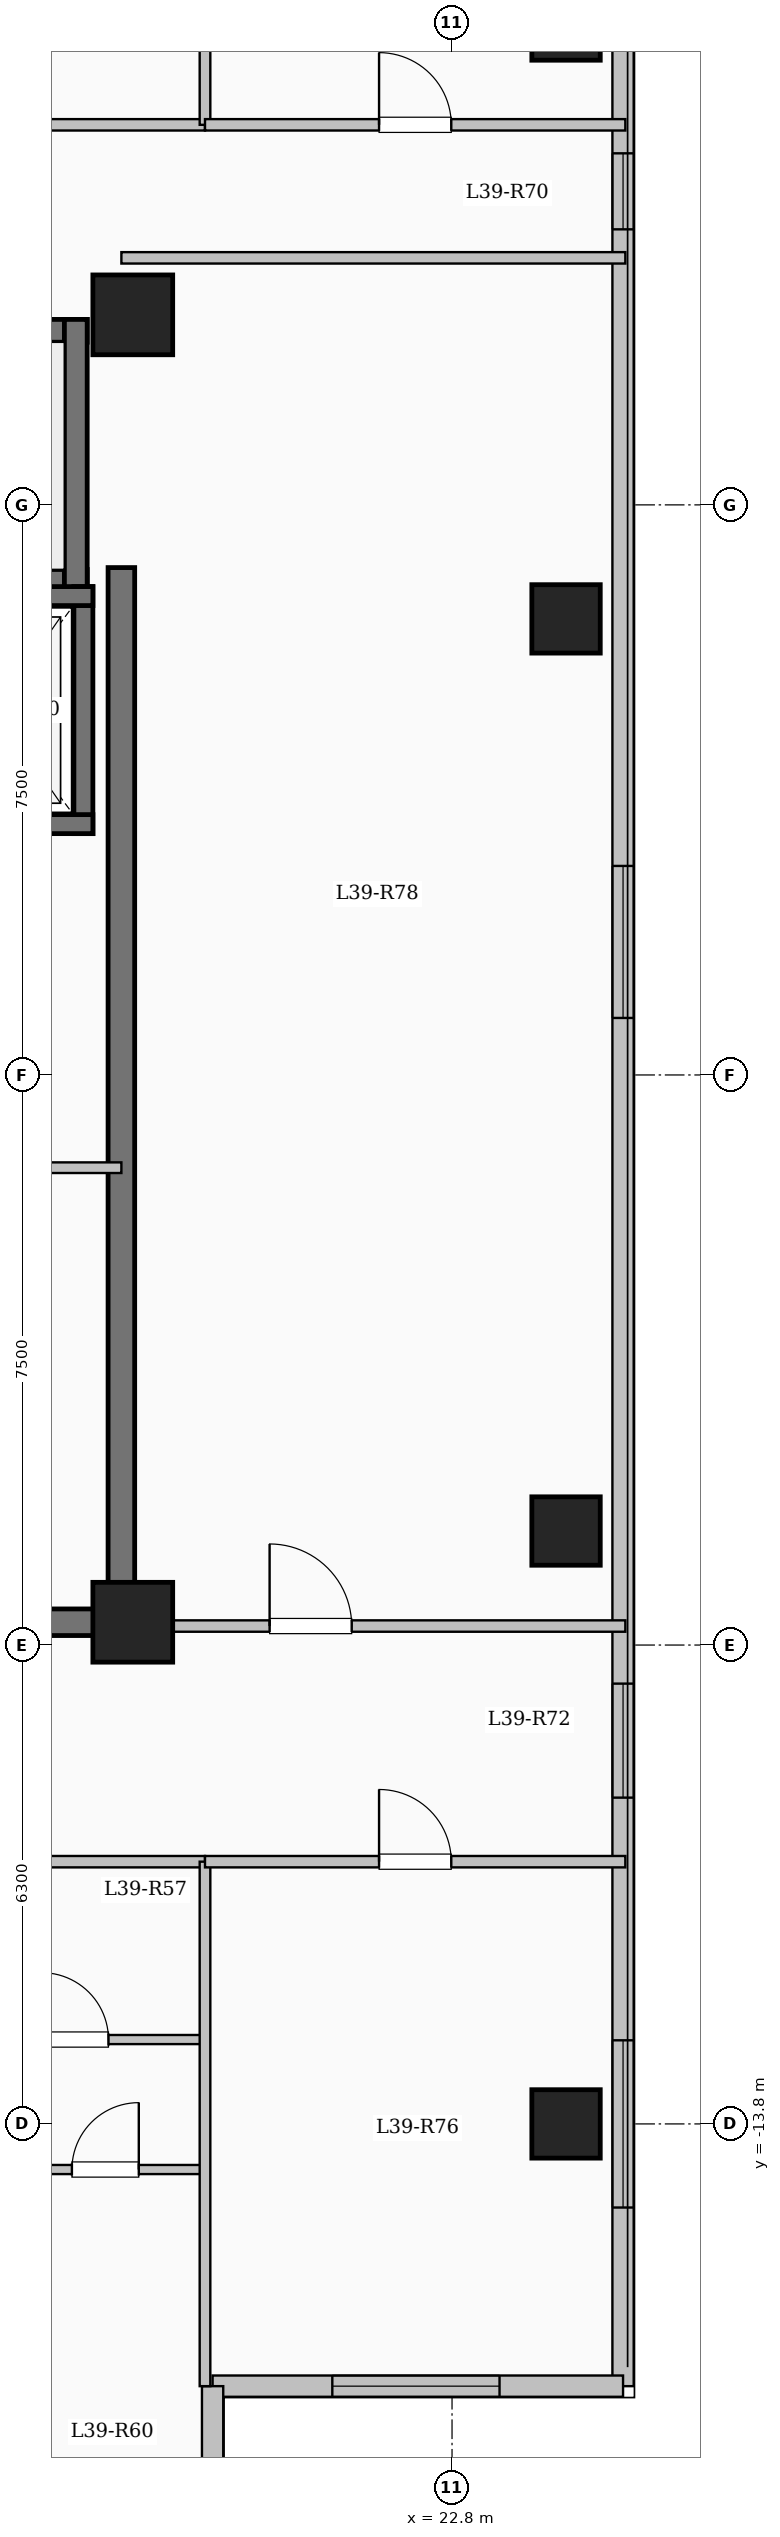
"""IFC4 building model, lengths in metres.
Left out: names, types, materials, properties, quantities, classifications, styles, units other than length and angle.
Written with IfcOpenShell. Run it as: python <this file> out.ifc"""

import sys

from ifc_helpers import new_model, si_unit, direction, frame, frame_2d, origin, origin_2d, place, context, subcontext, project, spatial, rectangle, extrude, element, fill, save


model = new_model("IFC4")
c1 = context("Model", 3, precision=1e-05, world=origin(), true_north=direction((0.0, 1.0)))
c2 = subcontext(c1, "Body", "Model", "MODEL_VIEW")
j1 = project(units=[si_unit("LENGTHUNIT", "METRE"), si_unit("PLANEANGLEUNIT", "RADIAN")], contexts=[c1])
p1 = place(None, origin())
s1 = spatial("IfcSite", under=j1, at=p1, CompositionType="ELEMENT")
p2 = place(p1, origin())
s2 = spatial("IfcBuilding", under=s1, at=p2, CompositionType="ELEMENT")
p3 = place(p2, frame((0.0, 0.0, 146.0)))
s3 = spatial("IfcBuildingStorey", under=s2, at=p3, CompositionType="ELEMENT", Elevation=146.0)
for number, where, z_axis, x_axis in (
    (1, (18.6, -7.2, 0.0), (0.0, 0.0, 1.0), (1.0, 0.0, 0.0)),
    (2, (18.6, 10.0, 0.0), (0.0, 0.0, 1.0), (1.0, 0.0, 0.0)),
):
    element("IfcColumn", number, at=place(p3, frame(where, z_axis=z_axis, x_axis=x_axis)), inside=s3, PredefinedType="COLUMN", context=c2, shape_type="SweptSolid", body=[
        extrude(rectangle(XDim=1.05, YDim=1.05, at=origin_2d()), origin(), (0.0, 0.0, 1.0), 3.35),
    ])
for number, where, z_axis, x_axis in (
    (3, (24.3, -13.8, 0.0), (0.0, 0.0, 1.0), (1.0, 0.0, 0.0)),
    (4, (24.3, -6.0, 0.0), (0.0, 0.0, 1.0), (1.0, 0.0, 0.0)),
    (5, (24.3, 6.0, 0.0), (0.0, 0.0, 1.0), (1.0, 0.0, 0.0)),
    (6, (24.3, 13.8, 0.0), (0.0, 0.0, 1.0), (1.0, 0.0, 0.0)),
):
    element("IfcColumn", number, at=place(p3, frame(where, z_axis=z_axis, x_axis=x_axis)), inside=s3, PredefinedType="COLUMN", context=c2, shape_type="SweptSolid", body=[
        extrude(rectangle(XDim=0.9, YDim=0.9, at=origin_2d()), origin(), (0.0, 0.0, 1.0), 3.35),
    ])
p4 = place(p3, frame((25.05, 17.25, 0.0), z_axis=(0.0, 0.0, 1.0), x_axis=(0.0, -1.0, 0.0)))
e7 = element("IfcWall", 7, at=p4, inside=s3, PredefinedType="SOLIDWALL", context=c2, shape_type="SweptSolid", body=[
    extrude(rectangle(XDim=34.5, YDim=0.28, at=frame_2d((17.25, 0.0))), origin(), (0.0, 0.0, 1.0), 3.1),
])
p5 = place(p4, frame((1.375, 0.0, 0.9)))
e8 = element("IfcOpeningElement", 8, at=p5, cuts=e7, PredefinedType="OPENING", context=c2, shape_type="SweptSolid", body=[
    extrude(rectangle(XDim=2.0, YDim=1.7, at=frame_2d((1.0, 0.85))), frame((0.0, 0.15, 0.0), z_axis=(0.0, -1.0, 0.0), x_axis=(1.0, 0.0, 0.0)), (0.0, 0.0, 1.0), 0.3),
])
p6 = place(p4, frame((5.125, 0.0, 0.95)))
e9 = element("IfcOpeningElement", 9, at=p6, cuts=e7, PredefinedType="OPENING", context=c2, shape_type="SweptSolid", body=[
    extrude(rectangle(XDim=1.0, YDim=1.5, at=frame_2d((0.5, 0.75))), frame((0.0, 0.15, 0.0), z_axis=(0.0, -1.0, 0.0), x_axis=(1.0, 0.0, 0.0)), (0.0, 0.0, 1.0), 0.3),
])
p7 = place(p4, frame((14.5, 0.0, 0.9)))
e10 = element("IfcOpeningElement", 10, at=p7, cuts=e7, PredefinedType="OPENING", context=c2, shape_type="SweptSolid", body=[
    extrude(rectangle(XDim=2.0, YDim=1.7, at=frame_2d((1.0, 0.85))), frame((0.0, 0.15, 0.0), z_axis=(0.0, -1.0, 0.0), x_axis=(1.0, 0.0, 0.0)), (0.0, 0.0, 1.0), 0.3),
])
p8 = place(p4, frame((25.258, 0.0, 0.9)))
e11 = element("IfcOpeningElement", 11, at=p8, cuts=e7, PredefinedType="OPENING", context=c2, shape_type="SweptSolid", body=[
    extrude(rectangle(XDim=1.5, YDim=1.65, at=frame_2d((0.75, 0.825))), frame((0.0, 0.15, 0.0), z_axis=(0.0, -1.0, 0.0), x_axis=(1.0, 0.0, 0.0)), (0.0, 0.0, 1.0), 0.3),
])
p9 = place(p4, frame((29.95, 0.0, 0.9)))
e12 = element("IfcOpeningElement", 12, at=p9, cuts=e7, PredefinedType="OPENING", context=c2, shape_type="SweptSolid", body=[
    extrude(rectangle(XDim=2.2, YDim=1.75, at=frame_2d((1.1, 0.875))), frame((0.0, 0.15, 0.0), z_axis=(0.0, -1.0, 0.0), x_axis=(1.0, 0.0, 0.0)), (0.0, 0.0, 1.0), 0.3),
])
p10 = place(p3, frame((25.05, -17.25, 0.0), z_axis=(0.0, 0.0, 1.0), x_axis=(-1.0, 0.0, 0.0)))
e13 = element("IfcWall", 13, at=p10, inside=s3, PredefinedType="SOLIDWALL", context=c2, shape_type="SweptSolid", body=[
    extrude(rectangle(XDim=5.4, YDim=0.28, at=frame_2d((2.7, 0.0))), origin(), (0.0, 0.0, 1.0), 3.1),
])
p11 = place(p10, frame((1.625, 0.0, 0.9)))
e14 = element("IfcOpeningElement", 14, at=p11, cuts=e13, PredefinedType="OPENING", context=c2, shape_type="SweptSolid", body=[
    extrude(rectangle(XDim=2.2, YDim=1.75, at=frame_2d((1.1, 0.875))), frame((0.0, 0.15, 0.0), z_axis=(0.0, -1.0, 0.0), x_axis=(1.0, 0.0, 0.0)), (0.0, 0.0, 1.0), 0.3),
])
p12 = place(p3, frame((19.65, -17.25, 0.0), z_axis=(0.0, 0.0, 1.0), x_axis=(0.0, -1.0, 0.0)))
e15 = element("IfcWall", 15, at=p12, inside=s3, PredefinedType="SOLIDWALL", context=c2, shape_type="SweptSolid", body=[
    extrude(rectangle(XDim=3.9, YDim=0.28, at=frame_2d((1.95, 0.0))), origin(), (0.0, 0.0, 1.0), 3.1),
])
p13 = place(p12, frame((1.107, 0.0, 0.9)))
e16 = element("IfcOpeningElement", 16, at=p13, cuts=e15, PredefinedType="OPENING", context=c2, shape_type="SweptSolid", body=[
    extrude(rectangle(XDim=1.65, YDim=1.6, at=frame_2d((0.825, 0.8))), frame((0.0, 0.15, 0.0), z_axis=(0.0, -1.0, 0.0), x_axis=(1.0, 0.0, 0.0)), (0.0, 0.0, 1.0), 0.3),
])
p14 = place(p3, frame((10.0, 9.79, 0.0), z_axis=(0.0, 0.0, 1.0), x_axis=(1.0, 0.0, 0.0)))
e17 = element("IfcWall", 17, at=p14, inside=s3, PredefinedType="SHEAR", context=c2, shape_type="SweptSolid", body=[
    extrude(rectangle(XDim=8.0, YDim=0.3, at=frame_2d((4.0, 0.0))), origin(), (0.0, 0.0, 1.0), 3.35),
])
p15 = place(p3, frame((10.0, 6.5, 0.0), z_axis=(0.0, 0.0, 1.0), x_axis=(1.0, 0.0, 0.0)))
e18 = element("IfcWall", 18, at=p15, inside=s3, PredefinedType="SHEAR", context=c2, shape_type="SweptSolid", body=[
    extrude(rectangle(XDim=8.0, YDim=0.3, at=frame_2d((4.0, 0.0))), origin(), (0.0, 0.0, 1.0), 3.35),
])
p16 = place(p15, frame((0.55, 0.0, 0.0)))
e19 = element("IfcOpeningElement", 19, at=p16, cuts=e18, PredefinedType="OPENING", context=c2, shape_type="SweptSolid", body=[
    extrude(rectangle(XDim=1.0, YDim=2.15, at=frame_2d((0.5, 1.075))), frame((0.0, 0.16, 0.0), z_axis=(0.0, -1.0, 0.0), x_axis=(1.0, 0.0, 0.0)), (0.0, 0.0, 1.0), 0.32),
])
p17 = place(p3, frame((17.85, 6.35, 0.0), z_axis=(0.0, 0.0, 1.0), x_axis=(0.0, 1.0, 0.0)))
e20 = element("IfcWall", 20, at=p17, inside=s3, PredefinedType="SHEAR", context=c2, shape_type="SweptSolid", body=[
    extrude(rectangle(XDim=3.59, YDim=0.3, at=frame_2d((1.795, 0.0))), origin(), (0.0, 0.0, 1.0), 3.35),
])
p18 = place(p3, frame((17.95, 3.175, 0.0), z_axis=(0.0, 0.0, 1.0), x_axis=(0.0, 1.0, 0.0)))
e21 = element("IfcWall", 21, at=p18, inside=s3, PredefinedType="SHEAR", context=c2, shape_type="SweptSolid", body=[
    extrude(rectangle(XDim=3.25, YDim=0.25, at=frame_2d((1.625, 0.0))), origin(), (0.0, 0.0, 1.0), 3.35),
])
for number, where, z_axis, x_axis in (
    (22, (15.525, 3.3, 0.0), (0.0, 0.0, 1.0), (1.0, 0.0, 0.0)),
    (23, (15.525, 6.3, 0.0), (0.0, 0.0, 1.0), (1.0, 0.0, 0.0)),
):
    element("IfcWall", number, at=place(p3, frame(where, z_axis=z_axis, x_axis=x_axis)), inside=s3, PredefinedType="SHEAR", context=c2, shape_type="SweptSolid", body=[
        extrude(rectangle(XDim=2.55, YDim=0.25, at=frame_2d((1.275, 0.0))), origin(), (0.0, 0.0, 1.0), 3.35),
    ])
p19 = place(p3, frame((18.45, -7.375, 0.0), z_axis=(0.0, 0.0, 1.0), x_axis=(0.0, 1.0, 0.0)))
e24 = element("IfcWall", 24, at=p19, inside=s3, PredefinedType="SHEAR", context=c2, shape_type="SweptSolid", body=[
    extrude(rectangle(XDim=14.05, YDim=0.35, at=frame_2d((7.025, 0.0))), origin(), (0.0, 0.0, 1.0), 3.35),
])
p20 = place(p3, frame((10.075, -7.2, 0.0), z_axis=(0.0, 0.0, 1.0), x_axis=(1.0, 0.0, 0.0)))
e25 = element("IfcWall", 25, at=p20, inside=s3, PredefinedType="SHEAR", context=c2, shape_type="SweptSolid", body=[
    extrude(rectangle(XDim=8.55, YDim=0.35, at=frame_2d((4.275, 0.0))), origin(), (0.0, 0.0, 1.0), 3.35),
])
p21 = place(p3, frame((15.4, -1.22, 0.0), z_axis=(0.0, 0.0, 1.0), x_axis=(1.0, 0.0, 0.0)))
e26 = element("IfcWall", 26, at=p21, inside=s3, PredefinedType="PARTITIONING", context=c2, shape_type="SweptSolid", body=[
    extrude(rectangle(XDim=3.05, YDim=0.14, at=frame_2d((1.525, 0.0))), origin(), (0.0, 0.0, 1.0), 3.1),
])
p22 = place(p21, frame((1.05, 0.0, 0.0)))
e27 = element("IfcOpeningElement", 27, at=p22, cuts=e26, PredefinedType="OPENING", context=c2, shape_type="SweptSolid", body=[
    extrude(rectangle(XDim=0.9, YDim=2.08, at=frame_2d((0.45, 1.04))), frame((0.0, 0.08, 0.0), z_axis=(0.0, -1.0, 0.0), x_axis=(1.0, 0.0, 0.0)), (0.0, 0.0, 1.0), 0.16),
])
p23 = place(p3, frame((3.85, 12.5, 0.0), z_axis=(0.0, 0.0, 1.0), x_axis=(1.0, 0.0, 0.0)))
e28 = element("IfcWall", 28, at=p23, inside=s3, PredefinedType="PARTITIONING", context=c2, shape_type="SweptSolid", body=[
    extrude(rectangle(XDim=15.7, YDim=0.15, at=frame_2d((7.85, 0.0))), origin(), (0.0, 0.0, 1.0), 3.1),
])
p24 = place(p23, frame((0.7, 0.0, 0.0)))
e29 = element("IfcOpeningElement", 29, at=p24, cuts=e28, PredefinedType="OPENING", context=c2, shape_type="SweptSolid", body=[
    extrude(rectangle(XDim=0.96, YDim=2.15, at=frame_2d((0.48, 1.075))), frame((0.0, 0.085, 0.0), z_axis=(0.0, -1.0, 0.0), x_axis=(1.0, 0.0, 0.0)), (0.0, 0.0, 1.0), 0.17),
])
p25 = place(p3, frame((8.55, -10.35, 0.0), z_axis=(0.0, 0.0, 1.0), x_axis=(1.0, 0.0, 0.0)))
e30 = element("IfcWall", 30, at=p25, inside=s3, PredefinedType="PARTITIONING", context=c2, shape_type="SweptSolid", body=[
    extrude(rectangle(XDim=11.0, YDim=0.15, at=frame_2d((5.5, 0.0))), origin(), (0.0, 0.0, 1.0), 3.1),
])
p26 = place(p25, frame((0.75, 0.0, 0.0)))
e31 = element("IfcOpeningElement", 31, at=p26, cuts=e30, PredefinedType="OPENING", context=c2, shape_type="SweptSolid", body=[
    extrude(rectangle(XDim=0.96, YDim=2.15, at=frame_2d((0.48, 1.075))), frame((0.0, 0.085, 0.0), z_axis=(0.0, -1.0, 0.0), x_axis=(1.0, 0.0, 0.0)), (0.0, 0.0, 1.0), 0.17),
])
p27 = place(p3, frame((16.13, -12.69, 0.0), z_axis=(0.0, 0.0, 1.0), x_axis=(1.0, 0.0, 0.0)))
e32 = element("IfcWall", 32, at=p27, inside=s3, PredefinedType="PARTITIONING", context=c2, shape_type="SweptSolid", body=[
    extrude(rectangle(XDim=3.42, YDim=0.12, at=frame_2d((1.71, 0.0))), origin(), (0.0, 0.0, 1.0), 3.1),
])
p28 = place(p27, frame((1.27, 0.0, 0.0)))
e33 = element("IfcOpeningElement", 33, at=p28, cuts=e32, PredefinedType="OPENING", context=c2, shape_type="SweptSolid", body=[
    extrude(rectangle(XDim=0.88, YDim=2.1, at=frame_2d((0.44, 1.05))), frame((0.0, 0.07, 0.0), z_axis=(0.0, -1.0, 0.0), x_axis=(1.0, 0.0, 0.0)), (0.0, 0.0, 1.0), 0.14),
])
p29 = place(p3, frame((12.282, -14.4, 0.0), z_axis=(0.0, 0.0, 1.0), x_axis=(1.0, 0.0, 0.0)))
e34 = element("IfcWall", 34, at=p29, inside=s3, PredefinedType="PARTITIONING", context=c2, shape_type="SweptSolid", body=[
    extrude(rectangle(XDim=7.328, YDim=0.12, at=frame_2d((3.664, 0.0))), origin(), (0.0, 0.0, 1.0), 3.1),
])
p30 = place(p29, frame((0.751, 0.0, 0.0)))
e35 = element("IfcOpeningElement", 35, at=p30, cuts=e34, PredefinedType="OPENING", context=c2, shape_type="SweptSolid", body=[
    extrude(rectangle(XDim=0.88, YDim=2.1, at=frame_2d((0.44, 1.05))), frame((0.0, 0.07, 0.0), z_axis=(0.0, -1.0, 0.0), x_axis=(1.0, 0.0, 0.0)), (0.0, 0.0, 1.0), 0.14),
])
p31 = place(p29, frame((3.134, 0.0, 0.0)))
e36 = element("IfcOpeningElement", 36, at=p31, cuts=e34, PredefinedType="OPENING", context=c2, shape_type="SweptSolid", body=[
    extrude(rectangle(XDim=0.88, YDim=2.1, at=frame_2d((0.44, 1.05))), frame((0.0, 0.07, 0.0), z_axis=(0.0, -1.0, 0.0), x_axis=(1.0, 0.0, 0.0)), (0.0, 0.0, 1.0), 0.14),
])
p32 = place(p29, frame((5.517, 0.0, 0.0)))
e37 = element("IfcOpeningElement", 37, at=p32, cuts=e34, PredefinedType="OPENING", context=c2, shape_type="SweptSolid", body=[
    extrude(rectangle(XDim=0.88, YDim=2.1, at=frame_2d((0.44, 1.05))), frame((0.0, 0.07, 0.0), z_axis=(0.0, -1.0, 0.0), x_axis=(1.0, 0.0, 0.0)), (0.0, 0.0, 1.0), 0.14),
])
p33 = place(p3, frame((18.45, -7.25, 0.0), z_axis=(0.0, 0.0, 1.0), x_axis=(1.0, 0.0, 0.0)))
e38 = element("IfcWall", 38, at=p33, inside=s3, PredefinedType="PARTITIONING", context=c2, shape_type="SweptSolid", body=[
    extrude(rectangle(XDim=6.63, YDim=0.15, at=frame_2d((3.315, 0.0))), origin(), (0.0, 0.0, 1.0), 3.1),
])
p34 = place(p33, frame((1.95, 0.0, 0.0)))
e39 = element("IfcOpeningElement", 39, at=p34, cuts=e38, PredefinedType="OPENING", context=c2, shape_type="SweptSolid", body=[
    extrude(rectangle(XDim=1.08, YDim=2.15, at=frame_2d((0.54, 1.075))), frame((0.0, 0.085, 0.0), z_axis=(0.0, -1.0, 0.0), x_axis=(1.0, 0.0, 0.0)), (0.0, 0.0, 1.0), 0.17),
])
p35 = place(p3, frame((18.45, 10.75, 0.0), z_axis=(0.0, 0.0, 1.0), x_axis=(1.0, 0.0, 0.0)))
e40 = element("IfcWall", 40, at=p35, inside=s3, PredefinedType="PARTITIONING", context=c2, shape_type="SweptSolid", body=[
    extrude(rectangle(XDim=6.63, YDim=0.15, at=frame_2d((3.315, 0.0))), origin(), (0.0, 0.0, 1.0), 3.1),
])
p36 = place(p3, frame((19.55, -17.25, 0.0), z_axis=(0.0, 0.0, 1.0), x_axis=(0.0, 1.0, 0.0)))
e41 = element("IfcWall", 41, at=p36, inside=s3, PredefinedType="PARTITIONING", context=c2, shape_type="SweptSolid", body=[
    extrude(rectangle(XDim=6.9, YDim=0.14, at=frame_2d((3.45, 0.0))), origin(), (0.0, 0.0, 1.0), 3.1),
])
p37 = place(p3, frame((19.55, 12.5, 0.0), z_axis=(0.0, 0.0, 1.0), x_axis=(0.0, 1.0, 0.0)))
e42 = element("IfcWall", 42, at=p37, inside=s3, PredefinedType="PARTITIONING", context=c2, shape_type="SweptSolid", body=[
    extrude(rectangle(XDim=4.75, YDim=0.14, at=frame_2d((2.375, 0.0))), origin(), (0.0, 0.0, 1.0), 3.1),
])
p38 = place(p3, frame((19.55, 12.5, 0.0), z_axis=(0.0, 0.0, 1.0), x_axis=(1.0, 0.0, 0.0)))
e43 = element("IfcWall", 43, at=p38, inside=s3, PredefinedType="PARTITIONING", context=c2, shape_type="SweptSolid", body=[
    extrude(rectangle(XDim=5.53, YDim=0.15, at=frame_2d((2.765, 0.0))), origin(), (0.0, 0.0, 1.0), 3.1),
])
p39 = place(p38, frame((2.29, 0.0, 0.0)))
e44 = element("IfcOpeningElement", 44, at=p39, cuts=e43, PredefinedType="OPENING", context=c2, shape_type="SweptSolid", body=[
    extrude(rectangle(XDim=0.95, YDim=2.15, at=frame_2d((0.475, 1.075))), frame((0.0, 0.085, 0.0), z_axis=(0.0, -1.0, 0.0), x_axis=(1.0, 0.0, 0.0)), (0.0, 0.0, 1.0), 0.17),
])
p40 = place(p3, frame((19.55, -10.35, 0.0), z_axis=(0.0, 0.0, 1.0), x_axis=(1.0, 0.0, 0.0)))
e45 = element("IfcWall", 45, at=p40, inside=s3, PredefinedType="PARTITIONING", context=c2, shape_type="SweptSolid", body=[
    extrude(rectangle(XDim=5.53, YDim=0.15, at=frame_2d((2.765, 0.0))), origin(), (0.0, 0.0, 1.0), 3.1),
])
p41 = place(p40, frame((2.29, 0.0, 0.0)))
e46 = element("IfcOpeningElement", 46, at=p41, cuts=e45, PredefinedType="OPENING", context=c2, shape_type="SweptSolid", body=[
    extrude(rectangle(XDim=0.95, YDim=2.15, at=frame_2d((0.475, 1.075))), frame((0.0, 0.085, 0.0), z_axis=(0.0, -1.0, 0.0), x_axis=(1.0, 0.0, 0.0)), (0.0, 0.0, 1.0), 0.17),
])
p42 = place(p6, origin())
e47 = element("IfcWindow", 47, at=p42, inside=s3, PartitioningType="SINGLE_PANEL", PredefinedType="WINDOW", context=c2, shape_type="SweptSolid", body=[
    extrude(rectangle(XDim=1.0, YDim=1.5, at=frame_2d((0.5, 0.75))), frame((0.0, 0.03, 0.0), z_axis=(0.0, -1.0, 0.0), x_axis=(1.0, 0.0, 0.0)), (0.0, 0.0, 1.0), 0.06),
])
fill(e9, e47)
p43 = place(p7, origin())
e48 = element("IfcWindow", 48, at=p43, inside=s3, PartitioningType="SINGLE_PANEL", PredefinedType="WINDOW", context=c2, shape_type="SweptSolid", body=[
    extrude(rectangle(XDim=2.0, YDim=1.7, at=frame_2d((1.0, 0.85))), frame((0.0, 0.03, 0.0), z_axis=(0.0, -1.0, 0.0), x_axis=(1.0, 0.0, 0.0)), (0.0, 0.0, 1.0), 0.06),
])
fill(e10, e48)
p44 = place(p8, origin())
e49 = element("IfcWindow", 49, at=p44, inside=s3, PartitioningType="SINGLE_PANEL", PredefinedType="WINDOW", context=c2, shape_type="SweptSolid", body=[
    extrude(rectangle(XDim=1.5, YDim=1.65, at=frame_2d((0.75, 0.825))), frame((0.0, 0.03, 0.0), z_axis=(0.0, -1.0, 0.0), x_axis=(1.0, 0.0, 0.0)), (0.0, 0.0, 1.0), 0.06),
])
fill(e11, e49)
p45 = place(p9, origin())
e50 = element("IfcWindow", 50, at=p45, inside=s3, PartitioningType="SINGLE_PANEL", PredefinedType="WINDOW", context=c2, shape_type="SweptSolid", body=[
    extrude(rectangle(XDim=2.2, YDim=1.75, at=frame_2d((1.1, 0.875))), frame((0.0, 0.03, 0.0), z_axis=(0.0, -1.0, 0.0), x_axis=(1.0, 0.0, 0.0)), (0.0, 0.0, 1.0), 0.06),
])
fill(e12, e50)
p46 = place(p11, origin())
e51 = element("IfcWindow", 51, at=p46, inside=s3, PartitioningType="SINGLE_PANEL", PredefinedType="WINDOW", context=c2, shape_type="SweptSolid", body=[
    extrude(rectangle(XDim=2.2, YDim=1.75, at=frame_2d((1.1, 0.875))), frame((0.0, 0.03, 0.0), z_axis=(0.0, -1.0, 0.0), x_axis=(1.0, 0.0, 0.0)), (0.0, 0.0, 1.0), 0.06),
])
fill(e14, e51)
p47 = place(p28, origin())
e52 = element("IfcDoor", 52, at=p47, inside=s3, OperationType="SINGLE_SWING_LEFT", PredefinedType="DOOR", context=c2, shape_type="SweptSolid", body=[
    extrude(rectangle(XDim=0.88, YDim=2.1, at=frame_2d((0.44, 1.05))), frame((0.0, 0.025, 0.0), z_axis=(0.0, -1.0, 0.0), x_axis=(1.0, 0.0, 0.0)), (0.0, 0.0, 1.0), 0.05),
])
fill(e33, e52)
p48 = place(p32, origin())
e53 = element("IfcDoor", 53, at=p48, inside=s3, OperationType="SINGLE_SWING_RIGHT", PredefinedType="DOOR", context=c2, shape_type="SweptSolid", body=[
    extrude(rectangle(XDim=0.88, YDim=2.1, at=frame_2d((0.44, 1.05))), frame((0.0, 0.025, 0.0), z_axis=(0.0, -1.0, 0.0), x_axis=(1.0, 0.0, 0.0)), (0.0, 0.0, 1.0), 0.05),
])
fill(e37, e53)
p49 = place(p39, origin())
e54 = element("IfcDoor", 54, at=p49, inside=s3, OperationType="SINGLE_SWING_LEFT", PredefinedType="DOOR", context=c2, shape_type="SweptSolid", body=[
    extrude(rectangle(XDim=0.95, YDim=2.15, at=frame_2d((0.475, 1.075))), frame((0.0, 0.025, 0.0), z_axis=(0.0, -1.0, 0.0), x_axis=(1.0, 0.0, 0.0)), (0.0, 0.0, 1.0), 0.05),
])
fill(e44, e54)
p50 = place(p41, origin())
e55 = element("IfcDoor", 55, at=p50, inside=s3, OperationType="SINGLE_SWING_LEFT", PredefinedType="DOOR", context=c2, shape_type="SweptSolid", body=[
    extrude(rectangle(XDim=0.95, YDim=2.15, at=frame_2d((0.475, 1.075))), frame((0.0, 0.025, 0.0), z_axis=(0.0, -1.0, 0.0), x_axis=(1.0, 0.0, 0.0)), (0.0, 0.0, 1.0), 0.05),
])
fill(e46, e55)
p51 = place(p34, origin())
e56 = element("IfcDoor", 56, at=p51, inside=s3, OperationType="SINGLE_SWING_LEFT", PredefinedType="DOOR", context=c2, shape_type="SweptSolid", body=[
    extrude(rectangle(XDim=1.08, YDim=2.15, at=frame_2d((0.54, 1.075))), frame((0.0, 0.025, 0.0), z_axis=(0.0, -1.0, 0.0), x_axis=(1.0, 0.0, 0.0)), (0.0, 0.0, 1.0), 0.05),
])
fill(e39, e56)
save(model, sys.argv[1])
